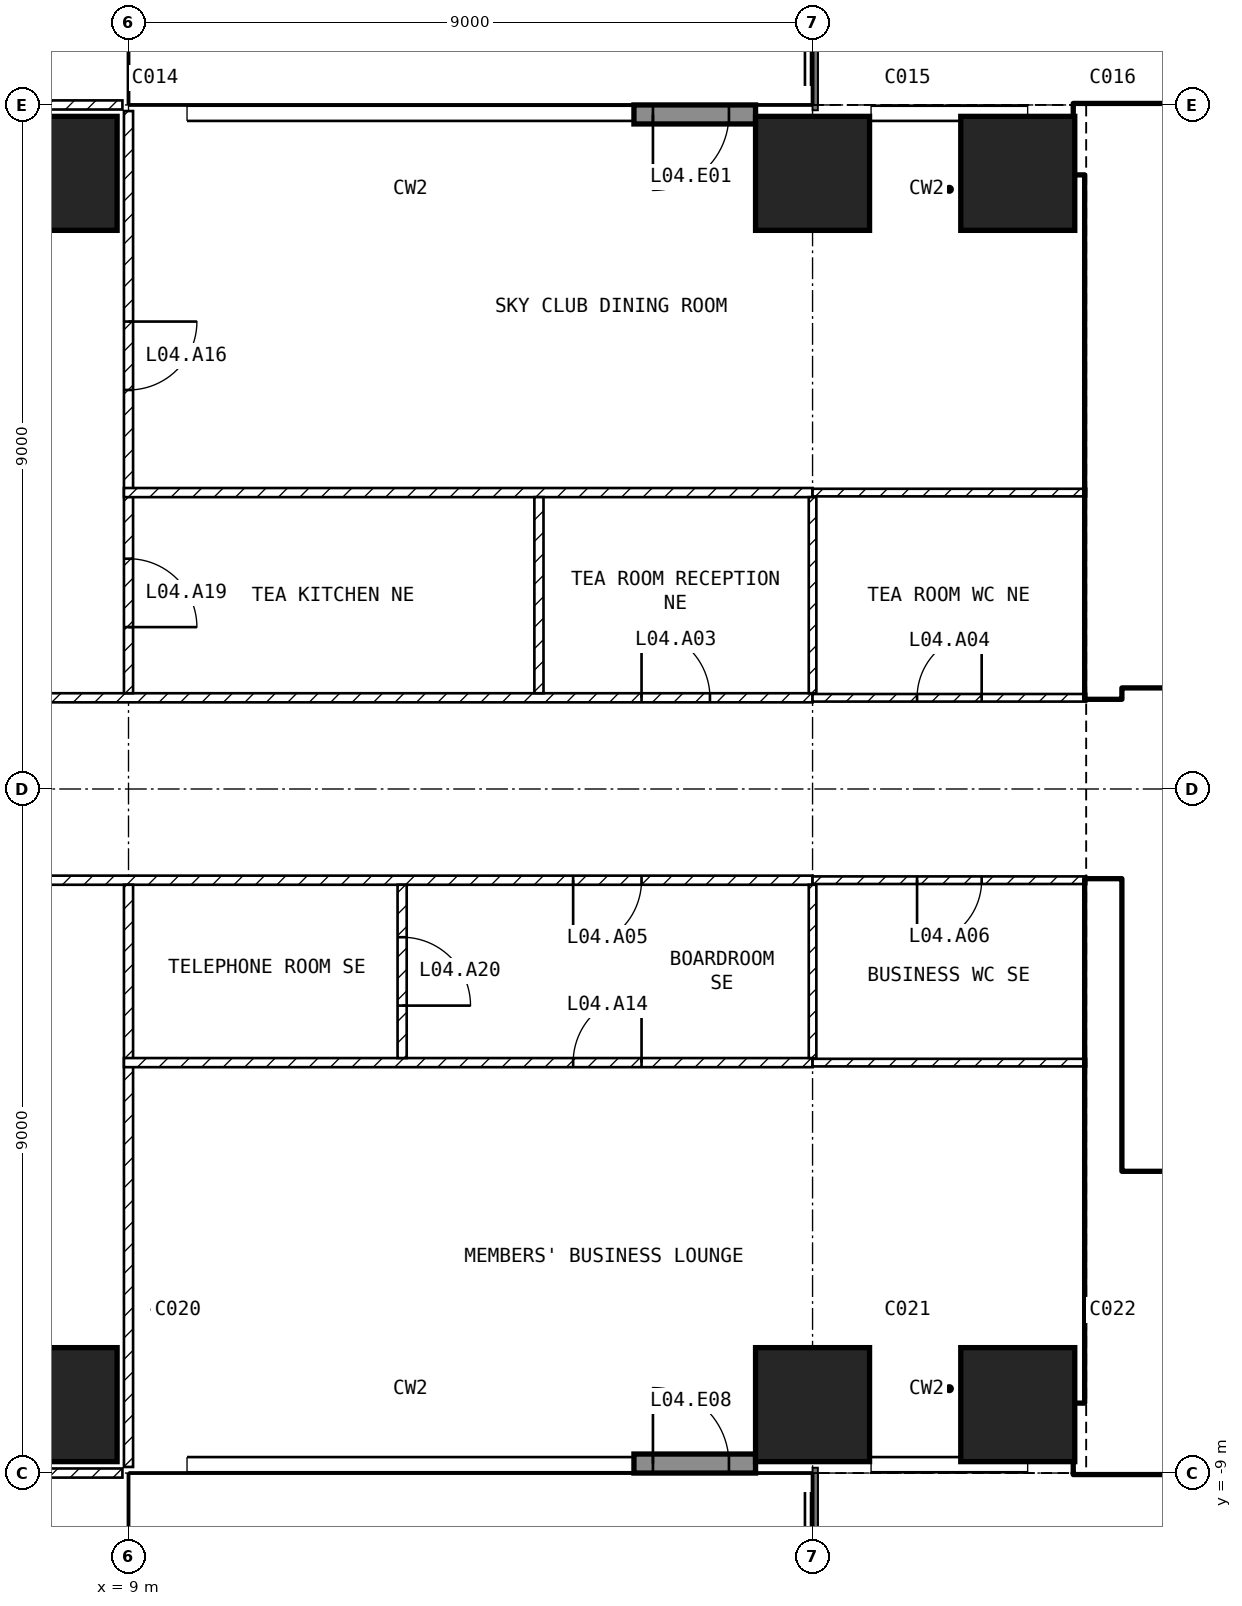
"""IFC4 building model, lengths in metres.
Left out: names, types, materials, properties, quantities, classifications, styles, units other than length and angle.
Written with IfcOpenShell. Run it as: python <this file> out.ifc"""

import sys

from ifc_helpers import new_model, si_unit, direction, frame, frame_2d, origin, origin_2d, place, context, subcontext, project, spatial, rectangle, extrude, element, fill, save


model = new_model("IFC4")
c1 = context("Model", 3, precision=1e-05, world=origin(), true_north=direction((0.0, 1.0)))
c2 = subcontext(c1, "Body", "Model", "MODEL_VIEW")
j1 = project(units=[si_unit("LENGTHUNIT", "METRE"), si_unit("PLANEANGLEUNIT", "RADIAN")], contexts=[c1])
p1 = place(None, origin())
s1 = spatial("IfcSite", under=j1, at=p1, CompositionType="ELEMENT")
p2 = place(p1, origin())
s2 = spatial("IfcBuilding", under=s1, at=p2, CompositionType="ELEMENT")
p3 = place(p2, frame((0.0, 0.0, 32.0)))
s3 = spatial("IfcBuildingStorey", under=s2, at=p3, CompositionType="ELEMENT", Elevation=32.0)
for number, where, z_axis, x_axis in (
    (1, (8.1, -8.1, -0.3), (0.0, 0.0, 1.0), (1.0, 0.0, 0.0)),
    (2, (8.1, 8.1, -0.3), (0.0, 0.0, 1.0), (1.0, 0.0, 0.0)),
    (3, (18.0, -8.1, -0.3), (0.0, 0.0, 1.0), (1.0, 0.0, 0.0)),
    (4, (18.0, 8.1, -0.3), (0.0, 0.0, 1.0), (1.0, 0.0, 0.0)),
    (5, (20.7, -8.1, -0.3), (0.0, 0.0, 1.0), (1.0, 0.0, 0.0)),
    (6, (20.7, 8.1, -0.3), (0.0, 0.0, 1.0), (1.0, 0.0, 0.0)),
):
    element("IfcColumn", number, at=place(p3, frame(where, z_axis=z_axis, x_axis=x_axis)), inside=s3, PredefinedType="COLUMN", context=c2, shape_type="SweptSolid", body=[
        extrude(rectangle(XDim=1.5, YDim=1.5, at=origin_2d()), origin(), (0.0, 0.0, 1.0), 4.55),
    ])
p4 = place(p3, frame((17.25, 8.875, 0.0), z_axis=(0.0, 0.0, 1.0), x_axis=(-1.0, 0.0, 0.0)))
e7 = element("IfcWall", 7, at=p4, inside=s3, PredefinedType="SOLIDWALL", context=c2, shape_type="SweptSolid", body=[
    extrude(rectangle(XDim=1.6, YDim=0.25, at=frame_2d((0.8, 0.0))), origin(), (0.0, 0.0, 1.0), 4.25),
])
p5 = place(p4, frame((0.35, 0.0, 0.0)))
e8 = element("IfcOpeningElement", 8, at=p5, cuts=e7, PredefinedType="OPENING", context=c2, shape_type="SweptSolid", body=[
    extrude(rectangle(XDim=1.0, YDim=2.4, at=frame_2d((0.5, 1.2))), frame((0.0, 0.135, 0.0), z_axis=(0.0, -1.0, 0.0), x_axis=(1.0, 0.0, 0.0)), (0.0, 0.0, 1.0), 0.27),
])
p6 = place(p3, frame((15.65, -8.875, 0.0), z_axis=(0.0, 0.0, 1.0), x_axis=(1.0, 0.0, 0.0)))
e9 = element("IfcWall", 9, at=p6, inside=s3, PredefinedType="SOLIDWALL", context=c2, shape_type="SweptSolid", body=[
    extrude(rectangle(XDim=1.6, YDim=0.25, at=frame_2d((0.8, 0.0))), origin(), (0.0, 0.0, 1.0), 4.25),
])
p7 = place(p6, frame((0.25, 0.0, 0.0)))
e10 = element("IfcOpeningElement", 10, at=p7, cuts=e9, PredefinedType="OPENING", context=c2, shape_type="SweptSolid", body=[
    extrude(rectangle(XDim=1.0, YDim=2.4, at=frame_2d((0.5, 1.2))), frame((0.0, 0.135, 0.0), z_axis=(0.0, -1.0, 0.0), x_axis=(1.0, 0.0, 0.0)), (0.0, 0.0, 1.0), 0.27),
])
p8 = place(p3, frame((21.45, -8.55, 0.0), z_axis=(0.0, 0.0, 1.0), x_axis=(1.0, 0.0, 0.0)))
e11 = element("IfcWall", 11, at=p8, inside=s3, PredefinedType="SHEAR", context=c2, shape_type="SweptSolid", body=[
    extrude(rectangle(XDim=10.95, YDim=0.9, at=frame_2d((5.475, 0.0))), origin(), (0.0, 0.0, 1.0), 4.25),
])
p9 = place(p3, frame((21.45, 8.55, 0.0), z_axis=(0.0, 0.0, 1.0), x_axis=(1.0, 0.0, 0.0)))
e12 = element("IfcWall", 12, at=p9, inside=s3, PredefinedType="SHEAR", context=c2, shape_type="SweptSolid", body=[
    extrude(rectangle(XDim=10.05, YDim=0.9, at=frame_2d((5.025, 0.0))), origin(), (0.0, 0.0, 1.0), 4.25),
])
for number, where, z_axis, x_axis in (
    (13, (21.825, -8.1, 0.0), (0.0, 0.0, 1.0), (0.0, 1.0, 0.0)),
    (14, (21.825, 1.2, 0.0), (0.0, 0.0, 1.0), (0.0, 1.0, 0.0)),
):
    element("IfcWall", number, at=place(p3, frame(where, z_axis=z_axis, x_axis=x_axis)), inside=s3, PredefinedType="SHEAR", context=c2, shape_type="SweptSolid", body=[
        extrude(rectangle(XDim=6.9, YDim=0.45, at=frame_2d((3.45, 0.0))), origin(), (0.0, 0.0, 1.0), 4.25),
    ])
p10 = place(p3, frame((22.05, 1.45, 0.0), z_axis=(0.0, 0.0, 1.0), x_axis=(1.0, 0.0, 0.0)))
e15 = element("IfcWall", 15, at=p10, inside=s3, PredefinedType="SOLIDWALL", context=c2, shape_type="SweptSolid", body=[
    extrude(rectangle(XDim=13.05, YDim=0.2, at=frame_2d((6.525, 0.0))), origin(), (0.0, 0.0, 1.0), 4.25),
])
p11 = place(p10, frame((0.75, 0.0, 0.0)))
e16 = element("IfcOpeningElement", 16, at=p11, cuts=e15, PredefinedType="OPENING", context=c2, shape_type="SweptSolid", body=[
    extrude(rectangle(XDim=1.0, YDim=2.1, at=frame_2d((0.5, 1.05))), frame((0.0, 0.11, 0.0), z_axis=(0.0, -1.0, 0.0), x_axis=(1.0, 0.0, 0.0)), (0.0, 0.0, 1.0), 0.22),
])
p12 = place(p10, frame((3.25, 0.0, 0.0)))
e17 = element("IfcOpeningElement", 17, at=p12, cuts=e15, PredefinedType="OPENING", context=c2, shape_type="SweptSolid", body=[
    extrude(rectangle(XDim=1.0, YDim=2.1, at=frame_2d((0.5, 1.05))), frame((0.0, 0.11, 0.0), z_axis=(0.0, -1.0, 0.0), x_axis=(1.0, 0.0, 0.0)), (0.0, 0.0, 1.0), 0.22),
])
p13 = place(p3, frame((22.05, 5.15, 0.0), z_axis=(0.0, 0.0, 1.0), x_axis=(1.0, 0.0, 0.0)))
e18 = element("IfcWall", 18, at=p13, inside=s3, PredefinedType="SOLIDWALL", context=c2, shape_type="SweptSolid", body=[
    extrude(rectangle(XDim=6.3, YDim=0.2, at=frame_2d((3.15, 0.0))), origin(), (0.0, 0.0, 1.0), 4.25),
])
p14 = place(p13, frame((0.2, 0.0, 0.0)))
e19 = element("IfcOpeningElement", 19, at=p14, cuts=e18, PredefinedType="OPENING", context=c2, shape_type="SweptSolid", body=[
    extrude(rectangle(XDim=1.0, YDim=2.1, at=frame_2d((0.5, 1.05))), frame((0.0, 0.11, 0.0), z_axis=(0.0, -1.0, 0.0), x_axis=(1.0, 0.0, 0.0)), (0.0, 0.0, 1.0), 0.22),
])
p15 = place(p3, frame((22.05, -5.15, 0.0), z_axis=(0.0, 0.0, 1.0), x_axis=(1.0, 0.0, 0.0)))
e20 = element("IfcWall", 20, at=p15, inside=s3, PredefinedType="SOLIDWALL", context=c2, shape_type="SweptSolid", body=[
    extrude(rectangle(XDim=6.3, YDim=0.2, at=frame_2d((3.15, 0.0))), origin(), (0.0, 0.0, 1.0), 4.25),
])
p16 = place(p15, frame((0.2, 0.0, 0.0)))
e21 = element("IfcOpeningElement", 21, at=p16, cuts=e20, PredefinedType="OPENING", context=c2, shape_type="SweptSolid", body=[
    extrude(rectangle(XDim=1.0, YDim=2.1, at=frame_2d((0.5, 1.05))), frame((0.0, 0.11, 0.0), z_axis=(0.0, -1.0, 0.0), x_axis=(1.0, 0.0, 0.0)), (0.0, 0.0, 1.0), 0.22),
])
p17 = place(p3, frame((-12.6, 1.2, 0.0), z_axis=(0.0, 0.0, 1.0), x_axis=(1.0, 0.0, 0.0)))
e22 = element("IfcWall", 22, at=p17, inside=s3, PredefinedType="PARTITIONING", context=c2, shape_type="SweptSolid", body=[
    extrude(rectangle(XDim=30.6, YDim=0.12, at=frame_2d((15.3, 0.0))), origin(), (0.0, 0.0, 1.0), 4.25),
])
p18 = place(p17, frame((11.7, 0.0, 0.0)))
e23 = element("IfcOpeningElement", 23, at=p18, cuts=e22, PredefinedType="OPENING", context=c2, shape_type="SweptSolid", body=[
    extrude(rectangle(XDim=1.8, YDim=2.1, at=frame_2d((0.9, 1.05))), frame((0.0, 0.07, 0.0), z_axis=(0.0, -1.0, 0.0), x_axis=(1.0, 0.0, 0.0)), (0.0, 0.0, 1.0), 0.14),
])
p19 = place(p17, frame((28.35, 0.0, 0.0)))
e24 = element("IfcOpeningElement", 24, at=p19, cuts=e22, PredefinedType="OPENING", context=c2, shape_type="SweptSolid", body=[
    extrude(rectangle(XDim=0.9, YDim=2.1, at=frame_2d((0.45, 1.05))), frame((0.0, 0.07, 0.0), z_axis=(0.0, -1.0, 0.0), x_axis=(1.0, 0.0, 0.0)), (0.0, 0.0, 1.0), 0.14),
])
p20 = place(p3, frame((18.0, -1.2, 0.0), z_axis=(0.0, 0.0, 1.0), x_axis=(-1.0, 0.0, 0.0)))
e25 = element("IfcWall", 25, at=p20, inside=s3, PredefinedType="PARTITIONING", context=c2, shape_type="SweptSolid", body=[
    extrude(rectangle(XDim=36.0, YDim=0.12, at=frame_2d((18.0, 0.0))), origin(), (0.0, 0.0, 1.0), 4.25),
])
p21 = place(p20, frame((17.1, 0.0, 0.0)))
e26 = element("IfcOpeningElement", 26, at=p21, cuts=e25, PredefinedType="OPENING", context=c2, shape_type="SweptSolid", body=[
    extrude(rectangle(XDim=1.8, YDim=2.1, at=frame_2d((0.9, 1.05))), frame((0.0, 0.07, 0.0), z_axis=(0.0, -1.0, 0.0), x_axis=(1.0, 0.0, 0.0)), (0.0, 0.0, 1.0), 0.14),
])
p22 = place(p20, frame((2.25, 0.0, 0.0)))
e27 = element("IfcOpeningElement", 27, at=p22, cuts=e25, PredefinedType="OPENING", context=c2, shape_type="SweptSolid", body=[
    extrude(rectangle(XDim=0.9, YDim=2.1, at=frame_2d((0.45, 1.05))), frame((0.0, 0.07, 0.0), z_axis=(0.0, -1.0, 0.0), x_axis=(1.0, 0.0, 0.0)), (0.0, 0.0, 1.0), 0.14),
])
p23 = place(p20, frame((29.85, 0.0, 0.0)))
e28 = element("IfcOpeningElement", 28, at=p23, cuts=e25, PredefinedType="OPENING", context=c2, shape_type="SweptSolid", body=[
    extrude(rectangle(XDim=0.9, YDim=2.1, at=frame_2d((0.45, 1.05))), frame((0.0, 0.07, 0.0), z_axis=(0.0, -1.0, 0.0), x_axis=(1.0, 0.0, 0.0)), (0.0, 0.0, 1.0), 0.14),
])
p24 = place(p3, frame((18.0, 1.2, 0.0), z_axis=(0.0, 0.0, 1.0), x_axis=(1.0, 0.0, 0.0)))
e29 = element("IfcWall", 29, at=p24, inside=s3, PredefinedType="PARTITIONING", context=c2, shape_type="SweptSolid", body=[
    extrude(rectangle(XDim=3.6, YDim=0.1, at=frame_2d((1.8, 0.0))), origin(), (0.0, 0.0, 1.0), 4.25),
])
p25 = place(p24, frame((1.375, 0.0, 0.0)))
e30 = element("IfcOpeningElement", 30, at=p25, cuts=e29, PredefinedType="OPENING", context=c2, shape_type="SweptSolid", body=[
    extrude(rectangle(XDim=0.85, YDim=2.1, at=frame_2d((0.425, 1.05))), frame((0.0, 0.06, 0.0), z_axis=(0.0, -1.0, 0.0), x_axis=(1.0, 0.0, 0.0)), (0.0, 0.0, 1.0), 0.12),
])
p26 = place(p3, frame((21.6, -1.2, 0.0), z_axis=(0.0, 0.0, 1.0), x_axis=(-1.0, 0.0, 0.0)))
e31 = element("IfcWall", 31, at=p26, inside=s3, PredefinedType="PARTITIONING", context=c2, shape_type="SweptSolid", body=[
    extrude(rectangle(XDim=3.6, YDim=0.1, at=frame_2d((1.8, 0.0))), origin(), (0.0, 0.0, 1.0), 4.25),
])
p27 = place(p26, frame((1.375, 0.0, 0.0)))
e32 = element("IfcOpeningElement", 32, at=p27, cuts=e31, PredefinedType="OPENING", context=c2, shape_type="SweptSolid", body=[
    extrude(rectangle(XDim=0.85, YDim=2.1, at=frame_2d((0.425, 1.05))), frame((0.0, 0.06, 0.0), z_axis=(0.0, -1.0, 0.0), x_axis=(1.0, 0.0, 0.0)), (0.0, 0.0, 1.0), 0.12),
])
p28 = place(p3, frame((9.0, 8.92, 0.0), z_axis=(0.0, 0.0, 1.0), x_axis=(0.0, -1.0, 0.0)))
e33 = element("IfcWall", 33, at=p28, inside=s3, PredefinedType="PARTITIONING", context=c2, shape_type="SweptSolid", body=[
    extrude(rectangle(XDim=7.66, YDim=0.12, at=frame_2d((3.83, 0.0))), origin(), (0.0, 0.0, 1.0), 4.25),
])
p29 = place(p28, frame((2.77, 0.0, 0.0)))
e34 = element("IfcOpeningElement", 34, at=p29, cuts=e33, PredefinedType="OPENING", context=c2, shape_type="SweptSolid", body=[
    extrude(rectangle(XDim=0.9, YDim=2.1, at=frame_2d((0.45, 1.05))), frame((0.0, 0.07, 0.0), z_axis=(0.0, -1.0, 0.0), x_axis=(1.0, 0.0, 0.0)), (0.0, 0.0, 1.0), 0.14),
])
p30 = place(p28, frame((5.89, 0.0, 0.0)))
e35 = element("IfcOpeningElement", 35, at=p30, cuts=e33, PredefinedType="OPENING", context=c2, shape_type="SweptSolid", body=[
    extrude(rectangle(XDim=0.9, YDim=2.1, at=frame_2d((0.45, 1.05))), frame((0.0, 0.07, 0.0), z_axis=(0.0, -1.0, 0.0), x_axis=(1.0, 0.0, 0.0)), (0.0, 0.0, 1.0), 0.14),
])
p31 = place(p3, frame((4.5, 9.0, 0.0), z_axis=(0.0, 0.0, 1.0), x_axis=(1.0, 0.0, 0.0)))
e36 = element("IfcWall", 36, at=p31, inside=s3, PredefinedType="PARTITIONING", context=c2, shape_type="SweptSolid", body=[
    extrude(rectangle(XDim=4.42, YDim=0.12, at=frame_2d((2.21, 0.0))), origin(), (0.0, 0.0, 1.0), 4.25),
])
p32 = place(p3, frame((9.0, -1.26, 0.0), z_axis=(0.0, 0.0, 1.0), x_axis=(0.0, -1.0, 0.0)))
e37 = element("IfcWall", 37, at=p32, inside=s3, PredefinedType="PARTITIONING", context=c2, shape_type="SweptSolid", body=[
    extrude(rectangle(XDim=7.66, YDim=0.12, at=frame_2d((3.83, 0.0))), origin(), (0.0, 0.0, 1.0), 4.25),
])
p33 = place(p3, frame((8.92, -9.0, 0.0), z_axis=(0.0, 0.0, 1.0), x_axis=(-1.0, 0.0, 0.0)))
e38 = element("IfcWall", 38, at=p33, inside=s3, PredefinedType="PARTITIONING", context=c2, shape_type="SweptSolid", body=[
    extrude(rectangle(XDim=4.42, YDim=0.12, at=frame_2d((2.21, 0.0))), origin(), (0.0, 0.0, 1.0), 4.25),
])
p34 = place(p3, frame((18.0, 3.9, 0.0), z_axis=(0.0, 0.0, 1.0), x_axis=(-1.0, 0.0, 0.0)))
e39 = element("IfcWall", 39, at=p34, inside=s3, PredefinedType="PARTITIONING", context=c2, shape_type="SweptSolid", body=[
    extrude(rectangle(XDim=9.06, YDim=0.12, at=frame_2d((4.53, 0.0))), origin(), (0.0, 0.0, 1.0), 4.25),
])
p35 = place(p3, frame((21.6, 3.9, 0.0), z_axis=(0.0, 0.0, 1.0), x_axis=(-1.0, 0.0, 0.0)))
e40 = element("IfcWall", 40, at=p35, inside=s3, PredefinedType="PARTITIONING", context=c2, shape_type="SweptSolid", body=[
    extrude(rectangle(XDim=3.6, YDim=0.1, at=frame_2d((1.8, 0.0))), origin(), (0.0, 0.0, 1.0), 4.25),
])
p36 = place(p3, frame((14.4, 3.84, 0.0), z_axis=(0.0, 0.0, 1.0), x_axis=(0.0, -1.0, 0.0)))
e41 = element("IfcWall", 41, at=p36, inside=s3, PredefinedType="PARTITIONING", context=c2, shape_type="SweptSolid", body=[
    extrude(rectangle(XDim=2.58, YDim=0.12, at=frame_2d((1.29, 0.0))), origin(), (0.0, 0.0, 1.0), 4.25),
])
p37 = place(p3, frame((18.0, 3.84, 0.0), z_axis=(0.0, 0.0, 1.0), x_axis=(0.0, -1.0, 0.0)))
e42 = element("IfcWall", 42, at=p37, inside=s3, PredefinedType="PARTITIONING", context=c2, shape_type="SweptSolid", body=[
    extrude(rectangle(XDim=2.58, YDim=0.1, at=frame_2d((1.29, 0.0))), origin(), (0.0, 0.0, 1.0), 3.346),
])
p38 = place(p3, frame((8.94, -3.6, 0.0), z_axis=(0.0, 0.0, 1.0), x_axis=(1.0, 0.0, 0.0)))
e43 = element("IfcWall", 43, at=p38, inside=s3, PredefinedType="PARTITIONING", context=c2, shape_type="SweptSolid", body=[
    extrude(rectangle(XDim=9.06, YDim=0.12, at=frame_2d((4.53, 0.0))), origin(), (0.0, 0.0, 1.0), 4.25),
])
p39 = place(p38, frame((5.91, 0.0, 0.0)))
e44 = element("IfcOpeningElement", 44, at=p39, cuts=e43, PredefinedType="OPENING", context=c2, shape_type="SweptSolid", body=[
    extrude(rectangle(XDim=0.9, YDim=2.1, at=frame_2d((0.45, 1.05))), frame((0.0, 0.07, 0.0), z_axis=(0.0, -1.0, 0.0), x_axis=(1.0, 0.0, 0.0)), (0.0, 0.0, 1.0), 0.14),
])
p40 = place(p3, frame((18.0, -3.6, 0.0), z_axis=(0.0, 0.0, 1.0), x_axis=(1.0, 0.0, 0.0)))
e45 = element("IfcWall", 45, at=p40, inside=s3, PredefinedType="PARTITIONING", context=c2, shape_type="SweptSolid", body=[
    extrude(rectangle(XDim=3.6, YDim=0.1, at=frame_2d((1.8, 0.0))), origin(), (0.0, 0.0, 1.0), 4.25),
])
p41 = place(p3, frame((12.6, -1.26, 0.0), z_axis=(0.0, 0.0, 1.0), x_axis=(0.0, -1.0, 0.0)))
e46 = element("IfcWall", 46, at=p41, inside=s3, PredefinedType="PARTITIONING", context=c2, shape_type="SweptSolid", body=[
    extrude(rectangle(XDim=2.28, YDim=0.12, at=frame_2d((1.14, 0.0))), origin(), (0.0, 0.0, 1.0), 4.25),
])
p42 = place(p41, frame((0.69, 0.0, 0.0)))
e47 = element("IfcOpeningElement", 47, at=p42, cuts=e46, PredefinedType="OPENING", context=c2, shape_type="SweptSolid", body=[
    extrude(rectangle(XDim=0.9, YDim=2.1, at=frame_2d((0.45, 1.05))), frame((0.0, 0.07, 0.0), z_axis=(0.0, -1.0, 0.0), x_axis=(1.0, 0.0, 0.0)), (0.0, 0.0, 1.0), 0.14),
])
p43 = place(p3, frame((18.0, -1.26, 0.0), z_axis=(0.0, 0.0, 1.0), x_axis=(0.0, -1.0, 0.0)))
e48 = element("IfcWall", 48, at=p43, inside=s3, PredefinedType="PARTITIONING", context=c2, shape_type="SweptSolid", body=[
    extrude(rectangle(XDim=2.28, YDim=0.1, at=frame_2d((1.14, 0.0))), origin(), (0.0, 0.0, 1.0), 3.346),
])
p44 = place(p5, origin())
e49 = element("IfcDoor", 49, at=p44, inside=s3, OperationType="SINGLE_SWING_RIGHT", PredefinedType="DOOR", context=c2, shape_type="SweptSolid", body=[
    extrude(rectangle(XDim=1.0, YDim=2.4, at=frame_2d((0.5, 1.2))), frame((0.0, 0.025, 0.0), z_axis=(0.0, -1.0, 0.0), x_axis=(1.0, 0.0, 0.0)), (0.0, 0.0, 1.0), 0.05),
])
fill(e8, e49)
p45 = place(p7, origin())
e50 = element("IfcDoor", 50, at=p45, inside=s3, OperationType="SINGLE_SWING_LEFT", PredefinedType="DOOR", context=c2, shape_type="SweptSolid", body=[
    extrude(rectangle(XDim=1.0, YDim=2.4, at=frame_2d((0.5, 1.2))), frame((0.0, 0.025, 0.0), z_axis=(0.0, -1.0, 0.0), x_axis=(1.0, 0.0, 0.0)), (0.0, 0.0, 1.0), 0.05),
])
fill(e10, e50)
p46 = place(p16, origin())
e51 = element("IfcDoor", 51, at=p46, inside=s3, OperationType="SINGLE_SWING_LEFT", PredefinedType="DOOR", context=c2, shape_type="SweptSolid", body=[
    extrude(rectangle(XDim=1.0, YDim=2.1, at=frame_2d((0.5, 1.05))), frame((0.0, 0.025, 0.0), z_axis=(0.0, -1.0, 0.0), x_axis=(1.0, 0.0, 0.0)), (0.0, 0.0, 1.0), 0.05),
])
fill(e21, e51)
p47 = place(p14, origin())
e52 = element("IfcDoor", 52, at=p47, inside=s3, OperationType="SINGLE_SWING_LEFT", PredefinedType="DOOR", context=c2, shape_type="SweptSolid", body=[
    extrude(rectangle(XDim=1.0, YDim=2.1, at=frame_2d((0.5, 1.05))), frame((0.0, 0.025, 0.0), z_axis=(0.0, -1.0, 0.0), x_axis=(1.0, 0.0, 0.0)), (0.0, 0.0, 1.0), 0.05),
])
fill(e19, e52)
p48 = place(p19, origin())
e53 = element("IfcDoor", 53, at=p48, inside=s3, OperationType="SINGLE_SWING_LEFT", PredefinedType="DOOR", context=c2, shape_type="SweptSolid", body=[
    extrude(rectangle(XDim=0.9, YDim=2.1, at=frame_2d((0.45, 1.05))), frame((0.0, 0.025, 0.0), z_axis=(0.0, -1.0, 0.0), x_axis=(1.0, 0.0, 0.0)), (0.0, 0.0, 1.0), 0.05),
])
fill(e24, e53)
p49 = place(p25, origin())
e54 = element("IfcDoor", 54, at=p49, inside=s3, OperationType="SINGLE_SWING_RIGHT", PredefinedType="DOOR", context=c2, shape_type="SweptSolid", body=[
    extrude(rectangle(XDim=0.85, YDim=2.1, at=frame_2d((0.425, 1.05))), frame((0.0, 0.025, 0.0), z_axis=(0.0, -1.0, 0.0), x_axis=(1.0, 0.0, 0.0)), (0.0, 0.0, 1.0), 0.05),
])
fill(e30, e54)
p50 = place(p22, origin())
e55 = element("IfcDoor", 55, at=p50, inside=s3, OperationType="SINGLE_SWING_RIGHT", PredefinedType="DOOR", context=c2, shape_type="SweptSolid", body=[
    extrude(rectangle(XDim=0.9, YDim=2.1, at=frame_2d((0.45, 1.05))), frame((0.0, 0.025, 0.0), z_axis=(0.0, -1.0, 0.0), x_axis=(1.0, 0.0, 0.0)), (0.0, 0.0, 1.0), 0.05),
])
fill(e27, e55)
p51 = place(p27, origin())
e56 = element("IfcDoor", 56, at=p51, inside=s3, OperationType="SINGLE_SWING_RIGHT", PredefinedType="DOOR", context=c2, shape_type="SweptSolid", body=[
    extrude(rectangle(XDim=0.85, YDim=2.1, at=frame_2d((0.425, 1.05))), frame((0.0, 0.025, 0.0), z_axis=(0.0, -1.0, 0.0), x_axis=(1.0, 0.0, 0.0)), (0.0, 0.0, 1.0), 0.05),
])
fill(e32, e56)
p52 = place(p39, origin())
e57 = element("IfcDoor", 57, at=p52, inside=s3, OperationType="SINGLE_SWING_RIGHT", PredefinedType="DOOR", context=c2, shape_type="SweptSolid", body=[
    extrude(rectangle(XDim=0.9, YDim=2.1, at=frame_2d((0.45, 1.05))), frame((0.0, 0.025, 0.0), z_axis=(0.0, -1.0, 0.0), x_axis=(1.0, 0.0, 0.0)), (0.0, 0.0, 1.0), 0.05),
])
fill(e44, e57)
p53 = place(p29, origin())
e58 = element("IfcDoor", 58, at=p53, inside=s3, OperationType="SINGLE_SWING_LEFT", PredefinedType="DOOR", context=c2, shape_type="SweptSolid", body=[
    extrude(rectangle(XDim=0.9, YDim=2.1, at=frame_2d((0.45, 1.05))), frame((0.0, 0.025, 0.0), z_axis=(0.0, -1.0, 0.0), x_axis=(1.0, 0.0, 0.0)), (0.0, 0.0, 1.0), 0.05),
])
fill(e34, e58)
p54 = place(p30, origin())
e59 = element("IfcDoor", 59, at=p54, inside=s3, OperationType="SINGLE_SWING_RIGHT", PredefinedType="DOOR", context=c2, shape_type="SweptSolid", body=[
    extrude(rectangle(XDim=0.9, YDim=2.1, at=frame_2d((0.45, 1.05))), frame((0.0, 0.025, 0.0), z_axis=(0.0, -1.0, 0.0), x_axis=(1.0, 0.0, 0.0)), (0.0, 0.0, 1.0), 0.05),
])
fill(e35, e59)
p55 = place(p42, origin())
e60 = element("IfcDoor", 60, at=p55, inside=s3, OperationType="SINGLE_SWING_RIGHT", PredefinedType="DOOR", context=c2, shape_type="SweptSolid", body=[
    extrude(rectangle(XDim=0.9, YDim=2.1, at=frame_2d((0.45, 1.05))), frame((0.0, 0.025, 0.0), z_axis=(0.0, -1.0, 0.0), x_axis=(1.0, 0.0, 0.0)), (0.0, 0.0, 1.0), 0.05),
])
fill(e47, e60)
save(model, sys.argv[1])
